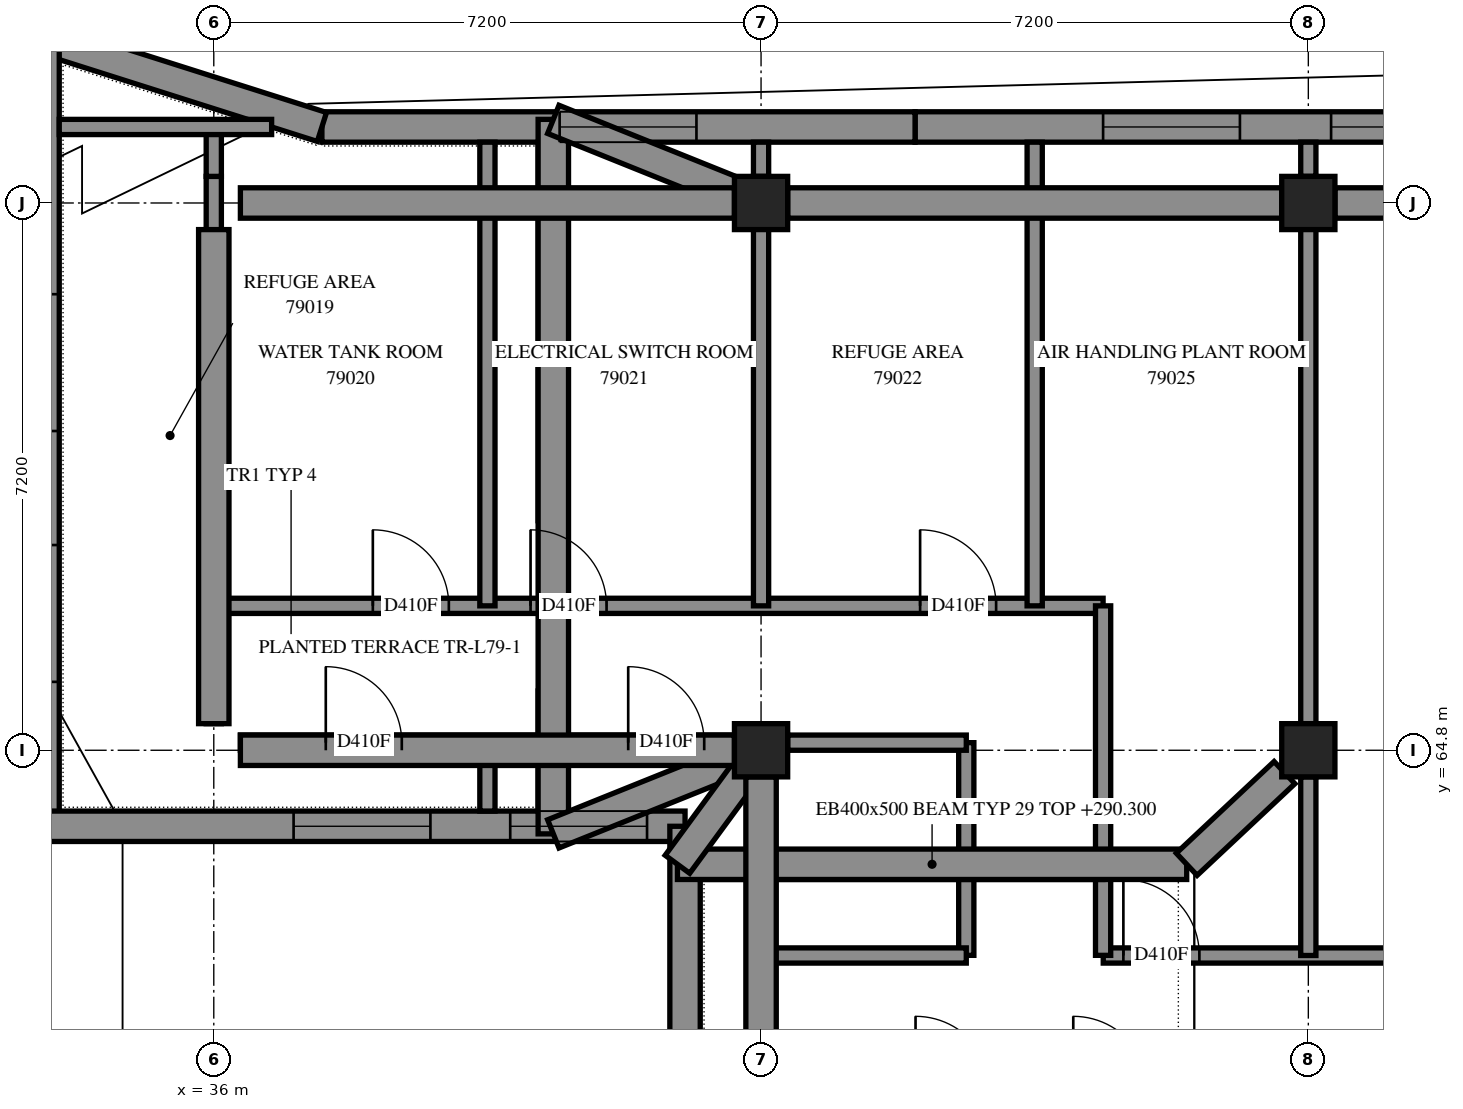
"""IFC4 building model, lengths in metres.
Left out: names, types, materials, properties, quantities, classifications, styles, units other than length and angle.
Written with IfcOpenShell. Run it as: python <this file> out.ifc"""

import sys

from ifc_helpers import new_model, si_unit, direction, frame, frame_2d, origin, origin_2d, place, context, subcontext, project, spatial, polyline, rectangle, outline, extrude, element, fill, save


model = new_model("IFC4")
c1 = context("Model", 3, precision=1e-05, world=origin(), true_north=direction((0.0, 1.0)))
c2 = subcontext(c1, "Body", "Model", "MODEL_VIEW")
j1 = project(units=[si_unit("LENGTHUNIT", "METRE"), si_unit("PLANEANGLEUNIT", "RADIAN")], contexts=[c1])
p1 = place(None, origin())
s1 = spatial("IfcSite", under=j1, at=p1, CompositionType="ELEMENT")
p2 = place(p1, origin())
s2 = spatial("IfcBuilding", under=s1, at=p2, CompositionType="ELEMENT")
p3 = place(p2, frame((0.0, 0.0, 290.6)))
s3 = spatial("IfcBuildingStorey", under=s2, at=p3, CompositionType="ELEMENT", Elevation=290.6)
for number, where, z_axis, x_axis in (
    (1, (43.2, 64.8, 0.0), (0.0, 0.0, 1.0), (1.0, 0.0, 0.0)),
    (2, (43.2, 72.0, 0.0), (0.0, 0.0, 1.0), (1.0, 0.0, 0.0)),
    (3, (50.4, 64.8, 0.0), (0.0, 0.0, 1.0), (1.0, 0.0, 0.0)),
    (4, (50.4, 72.0, 0.0), (0.0, 0.0, 1.0), (1.0, 0.0, 0.0)),
):
    element("IfcColumn", number, at=place(p3, frame(where, z_axis=z_axis, x_axis=x_axis)), inside=s3, PredefinedType="COLUMN", context=c2, shape_type="SweptSolid", body=[
        extrude(rectangle(XDim=0.7, YDim=0.7, at=origin_2d()), origin(), (0.0, 0.0, 1.0), 3.5),
    ])
p4 = place(p3, frame((52.999, 73.0, 0.0), z_axis=(0.0, 0.0, 1.0), x_axis=(-1.0, 0.0, 0.0)))
e5 = element("IfcWall", 5, at=p4, inside=s3, PredefinedType="SOLIDWALL", context=c2, shape_type="SweptSolid", body=[
    extrude(outline(polyline([(0.0, -0.2), (7.773, -0.2), (7.773, 0.2), (0.0, 0.2), (0.0, -0.2)])), origin(), (0.0, 0.0, 1.0), 3.0),
])
p5 = place(p4, frame((0.499, 0.0, 0.7)))
e6 = element("IfcOpeningElement", 6, at=p5, cuts=e5, PredefinedType="OPENING", context=c2, shape_type="SweptSolid", body=[
    extrude(rectangle(XDim=1.8, YDim=2.2, at=frame_2d((0.9, 1.1))), frame((0.0, 0.21, 0.0), z_axis=(0.0, -1.0, 0.0), x_axis=(1.0, 0.0, 0.0)), (0.0, 0.0, 1.0), 0.42),
])
p6 = place(p4, frame((3.499, 0.0, 0.7)))
e7 = element("IfcOpeningElement", 7, at=p6, cuts=e5, PredefinedType="OPENING", context=c2, shape_type="SweptSolid", body=[
    extrude(rectangle(XDim=1.8, YDim=2.2, at=frame_2d((0.9, 1.1))), frame((0.0, 0.21, 0.0), z_axis=(0.0, -1.0, 0.0), x_axis=(1.0, 0.0, 0.0)), (0.0, 0.0, 1.0), 0.42),
])
p7 = place(p3, frame((45.226, 73.0, 0.0), z_axis=(0.0, 0.0, 1.0), x_axis=(-1.0, 0.0, 0.0)))
e8 = element("IfcWall", 8, at=p7, inside=s3, PredefinedType="SOLIDWALL", context=c2, shape_type="SweptSolid", body=[
    extrude(outline(polyline([(0.0, -0.2), (7.773, -0.2), (7.835, 0.2), (0.0, 0.2), (0.0, -0.2)])), origin(), (0.0, 0.0, 1.0), 3.5),
])
p8 = place(p7, frame((2.876, 0.0, 0.7)))
e9 = element("IfcOpeningElement", 9, at=p8, cuts=e8, PredefinedType="OPENING", context=c2, shape_type="SweptSolid", body=[
    extrude(rectangle(XDim=1.8, YDim=2.2, at=frame_2d((0.9, 1.1))), frame((0.0, 0.21, 0.0), z_axis=(0.0, -1.0, 0.0), x_axis=(1.0, 0.0, 0.0)), (0.0, 0.0, 1.0), 0.42),
])
p9 = place(p3, frame((37.422, 73.0, 0.0), z_axis=(0.0, 0.0, 1.0), x_axis=(-0.9531802344, 0.3024027789, 0.0)))
e10 = element("IfcWall", 10, at=p9, inside=s3, PredefinedType="SOLIDWALL", context=c2, shape_type="SweptSolid", body=[
    extrude(outline(polyline([(0.031, -0.2), (4.108, -0.2), (3.562, 0.2), (-0.031, 0.2), (0.031, -0.2)])), origin(), (0.0, 0.0, 1.0), 3.5),
])
p10 = place(p3, frame((33.767, 74.16, 0.0), z_axis=(0.0, 0.0, 1.0), x_axis=(0.0, -1.0, 0.0)))
e11 = element("IfcWall", 11, at=p10, inside=s3, PredefinedType="SOLIDWALL", context=c2, shape_type="SweptSolid", body=[
    extrude(outline(polyline([(-0.273, -0.2), (10.56, -0.2), (10.16, 0.2), (0.273, 0.2), (-0.273, -0.2)])), origin(), (0.0, 0.0, 1.0), 3.5),
])
p11 = place(p10, frame((3.36, 0.0, 0.7)))
e12 = element("IfcOpeningElement", 12, at=p11, cuts=e11, PredefinedType="OPENING", context=c2, shape_type="SweptSolid", body=[
    extrude(rectangle(XDim=1.8, YDim=2.2, at=frame_2d((0.9, 1.1))), frame((0.0, 0.21, 0.0), z_axis=(0.0, -1.0, 0.0), x_axis=(1.0, 0.0, 0.0)), (0.0, 0.0, 1.0), 0.42),
])
p12 = place(p10, frame((6.66, 0.0, 0.7)))
e13 = element("IfcOpeningElement", 13, at=p12, cuts=e11, PredefinedType="OPENING", context=c2, shape_type="SweptSolid", body=[
    extrude(rectangle(XDim=1.8, YDim=2.2, at=frame_2d((0.9, 1.1))), frame((0.0, 0.21, 0.0), z_axis=(0.0, -1.0, 0.0), x_axis=(1.0, 0.0, 0.0)), (0.0, 0.0, 1.0), 0.42),
])
p13 = place(p3, frame((33.767, 63.8, 0.0), z_axis=(0.0, 0.0, 1.0), x_axis=(1.0, 0.0, 0.0)))
e14 = element("IfcWall", 14, at=p13, inside=s3, PredefinedType="SOLIDWALL", context=c2, shape_type="SweptSolid", body=[
    extrude(outline(polyline([(-0.2, -0.2), (8.233, -0.2), (8.633, 0.2), (0.2, 0.2), (-0.2, -0.2)])), origin(), (0.0, 0.0, 1.0), 3.5),
])
p14 = place(p13, frame((3.283, 0.0, 0.7)))
e15 = element("IfcOpeningElement", 15, at=p14, cuts=e14, PredefinedType="OPENING", context=c2, shape_type="SweptSolid", body=[
    extrude(rectangle(XDim=1.8, YDim=2.2, at=frame_2d((0.9, 1.1))), frame((0.0, 0.21, 0.0), z_axis=(0.0, -1.0, 0.0), x_axis=(1.0, 0.0, 0.0)), (0.0, 0.0, 1.0), 0.42),
])
p15 = place(p13, frame((6.133, 0.0, 0.7)))
e16 = element("IfcOpeningElement", 16, at=p15, cuts=e14, PredefinedType="OPENING", context=c2, shape_type="SweptSolid", body=[
    extrude(rectangle(XDim=1.8, YDim=2.2, at=frame_2d((0.9, 1.1))), frame((0.0, 0.21, 0.0), z_axis=(0.0, -1.0, 0.0), x_axis=(1.0, 0.0, 0.0)), (0.0, 0.0, 1.0), 0.42),
])
p16 = place(p3, frame((42.2, 63.8, 0.0), z_axis=(0.0, 0.0, 1.0), x_axis=(0.0, -1.0, 0.0)))
e17 = element("IfcWall", 17, at=p16, inside=s3, PredefinedType="SOLIDWALL", context=c2, shape_type="SweptSolid", body=[
    extrude(outline(polyline([(0.2, -0.2), (7.4, -0.2), (7.0, 0.2), (-0.2, 0.2), (0.2, -0.2)])), origin(), (0.0, 0.0, 1.0), 3.5),
])
p17 = place(p16, frame((3.6, 0.0, 0.7)))
e18 = element("IfcOpeningElement", 18, at=p17, cuts=e17, PredefinedType="OPENING", context=c2, shape_type="SweptSolid", body=[
    extrude(rectangle(XDim=1.8, YDim=2.2, at=frame_2d((0.9, 1.1))), frame((0.0, 0.21, 0.0), z_axis=(0.0, -1.0, 0.0), x_axis=(1.0, 0.0, 0.0)), (0.0, 0.0, 1.0), 0.42),
])
p18 = place(p3, frame((36.0, 66.7, 0.0), z_axis=(0.0, 0.0, 1.0), x_axis=(1.0, 0.0, 0.0)))
e19 = element("IfcWall", 19, at=p18, inside=s3, PredefinedType="PARTITIONING", context=c2, shape_type="SweptSolid", body=[
    extrude(rectangle(XDim=11.7, YDim=0.2, at=frame_2d((5.85, 0.0))), origin(), (0.0, 0.0, 1.0), 3.5),
])
p19 = place(p18, frame((2.092, 0.0, 0.0)))
e20 = element("IfcOpeningElement", 20, at=p19, cuts=e19, PredefinedType="OPENING", context=c2, shape_type="SweptSolid", body=[
    extrude(rectangle(XDim=1.0, YDim=2.1, at=frame_2d((0.5, 1.05))), frame((0.0, 0.11, 0.0), z_axis=(0.0, -1.0, 0.0), x_axis=(1.0, 0.0, 0.0)), (0.0, 0.0, 1.0), 0.22),
])
p20 = place(p18, frame((4.168, 0.0, 0.0)))
e21 = element("IfcOpeningElement", 21, at=p20, cuts=e19, PredefinedType="OPENING", context=c2, shape_type="SweptSolid", body=[
    extrude(rectangle(XDim=1.0, YDim=2.1, at=frame_2d((0.5, 1.05))), frame((0.0, 0.11, 0.0), z_axis=(0.0, -1.0, 0.0), x_axis=(1.0, 0.0, 0.0)), (0.0, 0.0, 1.0), 0.22),
])
p21 = place(p18, frame((9.293, 0.0, 0.0)))
e22 = element("IfcOpeningElement", 22, at=p21, cuts=e19, PredefinedType="OPENING", context=c2, shape_type="SweptSolid", body=[
    extrude(rectangle(XDim=1.0, YDim=2.1, at=frame_2d((0.5, 1.05))), frame((0.0, 0.11, 0.0), z_axis=(0.0, -1.0, 0.0), x_axis=(1.0, 0.0, 0.0)), (0.0, 0.0, 1.0), 0.22),
])
p22 = place(p3, frame((47.702, 62.1, 0.0), z_axis=(0.0, 0.0, 1.0), x_axis=(1.0, 0.0, 0.0)))
e23 = element("IfcWall", 23, at=p22, inside=s3, PredefinedType="PARTITIONING", context=c2, shape_type="SweptSolid", body=[
    extrude(rectangle(XDim=7.698, YDim=0.2, at=frame_2d((3.849, 0.0))), origin(), (0.0, 0.0, 1.0), 3.5),
])
p23 = place(p22, frame((0.265, 0.0, 0.0)))
e24 = element("IfcOpeningElement", 24, at=p23, cuts=e23, PredefinedType="OPENING", context=c2, shape_type="SweptSolid", body=[
    extrude(rectangle(XDim=1.0, YDim=2.1, at=frame_2d((0.5, 1.05))), frame((0.0, 0.11, 0.0), z_axis=(0.0, -1.0, 0.0), x_axis=(1.0, 0.0, 0.0)), (0.0, 0.0, 1.0), 0.22),
])
p24 = place(p22, frame((4.79, 0.0, 0.0)))
e25 = element("IfcOpeningElement", 25, at=p24, cuts=e23, PredefinedType="OPENING", context=c2, shape_type="SweptSolid", body=[
    extrude(rectangle(XDim=1.0, YDim=2.1, at=frame_2d((0.5, 1.05))), frame((0.0, 0.11, 0.0), z_axis=(0.0, -1.0, 0.0), x_axis=(1.0, 0.0, 0.0)), (0.0, 0.0, 1.0), 0.22),
])
p25 = place(p22, frame((6.495, 0.0, 0.0)))
e26 = element("IfcOpeningElement", 26, at=p25, cuts=e23, PredefinedType="OPENING", context=c2, shape_type="SweptSolid", body=[
    extrude(rectangle(XDim=1.0, YDim=2.1, at=frame_2d((0.5, 1.05))), frame((0.0, 0.11, 0.0), z_axis=(0.0, -1.0, 0.0), x_axis=(1.0, 0.0, 0.0)), (0.0, 0.0, 1.0), 0.22),
])
p26 = place(p3, frame((36.35, 64.9, 0.0), z_axis=(0.0, 0.0, 1.0), x_axis=(1.0, 0.0, 0.0)))
e27 = element("IfcWall", 27, at=p26, inside=s3, PredefinedType="PARTITIONING", context=c2, shape_type="SweptSolid", body=[
    extrude(rectangle(XDim=7.2, YDim=0.2, at=frame_2d((3.6, 0.0))), origin(), (0.0, 0.0, 1.0), 3.5),
])
p27 = place(p26, frame((1.123, 0.0, 0.0)))
e28 = element("IfcOpeningElement", 28, at=p27, cuts=e27, PredefinedType="OPENING", context=c2, shape_type="SweptSolid", body=[
    extrude(rectangle(XDim=1.0, YDim=2.1, at=frame_2d((0.5, 1.05))), frame((0.0, 0.11, 0.0), z_axis=(0.0, -1.0, 0.0), x_axis=(1.0, 0.0, 0.0)), (0.0, 0.0, 1.0), 0.22),
])
p28 = place(p26, frame((5.102, 0.0, 0.0)))
e29 = element("IfcOpeningElement", 29, at=p28, cuts=e27, PredefinedType="OPENING", context=c2, shape_type="SweptSolid", body=[
    extrude(rectangle(XDim=1.0, YDim=2.1, at=frame_2d((0.5, 1.05))), frame((0.0, 0.11, 0.0), z_axis=(0.0, -1.0, 0.0), x_axis=(1.0, 0.0, 0.0)), (0.0, 0.0, 1.0), 0.22),
])
p29 = place(p3, frame((50.4, 64.45, 0.0), z_axis=(0.0, 0.0, 1.0), x_axis=(0.0, 1.0, 0.0)))
e30 = element("IfcWall", 30, at=p29, inside=s3, PredefinedType="PARTITIONING", context=c2, shape_type="SweptSolid", body=[
    extrude(rectangle(XDim=7.9, YDim=0.2, at=frame_2d((3.95, 0.0))), origin(), (0.0, 0.0, 1.0), 3.5),
])
p30 = place(p3, frame((36.0, 66.7, 0.0), z_axis=(0.0, 0.0, 1.0), x_axis=(0.0, 1.0, 0.0)))
e31 = element("IfcWall", 31, at=p30, inside=s3, PredefinedType="PARTITIONING", context=c2, shape_type="SweptSolid", body=[
    extrude(rectangle(XDim=5.65, YDim=0.2, at=frame_2d((2.825, 0.0))), origin(), (0.0, 0.0, 1.0), 3.5),
])
p31 = place(p3, frame((43.2, 66.7, 0.0), z_axis=(0.0, 0.0, 1.0), x_axis=(0.0, 1.0, 0.0)))
e32 = element("IfcWall", 32, at=p31, inside=s3, PredefinedType="PARTITIONING", context=c2, shape_type="SweptSolid", body=[
    extrude(rectangle(XDim=5.65, YDim=0.2, at=frame_2d((2.825, 0.0))), origin(), (0.0, 0.0, 1.0), 3.0),
])
p32 = place(p3, frame((47.7, 62.102, 0.0), z_axis=(0.0, 0.0, 1.0), x_axis=(0.0, 1.0, 0.0)))
e33 = element("IfcWall", 33, at=p32, inside=s3, PredefinedType="PARTITIONING", context=c2, shape_type="SweptSolid", body=[
    extrude(rectangle(XDim=4.598, YDim=0.2, at=frame_2d((2.299, 0.0))), origin(), (0.0, 0.0, 1.0), 3.0),
])
p33 = place(p3, frame((45.9, 62.102, 0.0), z_axis=(0.0, 0.0, 1.0), x_axis=(0.0, 1.0, 0.0)))
e34 = element("IfcWall", 34, at=p33, inside=s3, PredefinedType="PARTITIONING", context=c2, shape_type="SweptSolid", body=[
    extrude(rectangle(XDim=2.798, YDim=0.2, at=frame_2d((1.399, 0.0))), origin(), (0.0, 0.0, 1.0), 3.5),
])
p34 = place(p3, frame((43.202, 62.1, 0.0), z_axis=(0.0, 0.0, 1.0), x_axis=(1.0, 0.0, 0.0)))
e35 = element("IfcWall", 35, at=p34, inside=s3, PredefinedType="PARTITIONING", context=c2, shape_type="SweptSolid", body=[
    extrude(rectangle(XDim=2.698, YDim=0.2, at=frame_2d((1.349, 0.0))), origin(), (0.0, 0.0, 1.0), 3.5),
])
for number, where, z_axis, x_axis in (
    (36, (43.55, 64.9, 0.0), (0.0, 0.0, 1.0), (1.0, 0.0, 0.0)),
    (37, (50.4, 62.1, 0.0), (0.0, 0.0, 1.0), (0.0, 1.0, 0.0)),
):
    element("IfcWall", number, at=place(p3, frame(where, z_axis=z_axis, x_axis=x_axis)), inside=s3, PredefinedType="PARTITIONING", context=c2, shape_type="SweptSolid", body=[
        extrude(rectangle(XDim=2.35, YDim=0.2, at=frame_2d((1.175, 0.0))), origin(), (0.0, 0.0, 1.0), 3.0),
    ])
p35 = place(p3, frame((43.2, 60.3, 0.0), z_axis=(0.0, 0.0, 1.0), x_axis=(0.0, 1.0, 0.0)))
e38 = element("IfcWall", 38, at=p35, inside=s3, PredefinedType="PARTITIONING", context=c2, shape_type="SweptSolid", body=[
    extrude(rectangle(XDim=1.8, YDim=0.2, at=frame_2d((0.9, 0.0))), origin(), (0.0, 0.0, 1.0), 3.5),
])
p36 = place(p3, frame((36.0, 65.15, 0.0), z_axis=(0.0, 0.0, 1.0), x_axis=(0.0, 1.0, 0.0)))
e39 = element("IfcWall", 39, at=p36, inside=s3, PredefinedType="PARTITIONING", context=c2, shape_type="SweptSolid", body=[
    extrude(rectangle(XDim=1.55, YDim=0.2, at=frame_2d((0.775, 0.0))), origin(), (0.0, 0.0, 1.0), 3.5),
])
p37 = place(p3, frame((36.0, 72.35, 0.0), z_axis=(0.0, 0.0, 1.0), x_axis=(0.0, 1.0, 0.0)))
e40 = element("IfcWall", 40, at=p37, inside=s3, PredefinedType="PARTITIONING", context=c2, shape_type="SweptSolid", body=[
    extrude(rectangle(XDim=0.65, YDim=0.2, at=frame_2d((0.325, 0.0))), origin(), (0.0, 0.0, 1.0), 3.5),
])
p38 = place(p3, frame((40.367, 64.0, 0.0), z_axis=(0.0, 0.0, 1.0), x_axis=(0.0, 1.0, 0.0)))
e41 = element("IfcWall", 41, at=p38, inside=s3, PredefinedType="PARAPET", context=c2, shape_type="SweptSolid", body=[
    extrude(outline(polyline([(0.0, -0.1), (1.58, -0.1), (1.58, 0.1), (0.0, 0.1), (0.0, -0.1)])), origin(), (0.0, 0.0, 1.0), 0.25),
])
p39 = place(p3, frame((40.367, 67.82, 0.0), z_axis=(0.0, 0.0, 1.0), x_axis=(0.0, 1.0, 0.0)))
e42 = element("IfcWall", 42, at=p39, inside=s3, PredefinedType="PARAPET", context=c2, shape_type="SweptSolid", body=[
    extrude(outline(polyline([(0.0, -0.1), (4.98, -0.1), (4.98, 0.1), (0.0, 0.1), (0.0, -0.1)])), origin(), (0.0, 0.0, 1.0), 0.25),
])
p40 = place(p3, frame((47.697, 63.2, 0.0), z_axis=(0.0, 0.0, 1.0), x_axis=(-1.0, 0.0, 0.0)))
e43 = element("IfcWall", 43, at=p40, inside=s3, PredefinedType="PARAPET", context=c2, shape_type="SweptSolid", body=[
    extrude(outline(polyline([(0.0, -0.1), (5.297, -0.1), (5.297, 0.1), (0.0, 0.1), (0.0, -0.1)])), origin(), (0.0, 0.0, 1.0), 0.25),
])
p41 = place(p3, frame((33.967, 73.0, 0.0), z_axis=(0.0, 0.0, 1.0), x_axis=(1.0, 0.0, 0.0)))
e44 = element("IfcWall", 44, at=p41, inside=s3, PredefinedType="PARTITIONING", context=c2, shape_type="SweptSolid", body=[
    extrude(outline(polyline([(0.0, -0.1), (2.794, -0.1), (2.794, 0.1), (0.0, 0.1), (0.0, -0.1)])), origin(), (0.0, 0.0, 1.0), 3.5),
])
for number, where, z_axis, x_axis in (
    (45, (39.6, 66.7, 0.0), (0.0, 0.0, 1.0), (0.0, 1.0, 0.0)),
    (46, (46.8, 66.7, 0.0), (0.0, 0.0, 1.0), (0.0, 1.0, 0.0)),
):
    element("IfcWall", number, at=place(p3, frame(where, z_axis=z_axis, x_axis=x_axis)), inside=s3, PredefinedType="PARTITIONING", context=c2, shape_type="SweptSolid", body=[
        extrude(outline(polyline([(0.0, -0.1), (6.1, -0.1), (6.1, 0.1), (0.0, 0.1), (0.0, -0.1)])), origin(), (0.0, 0.0, 1.0), 3.5),
    ])
p42 = place(p3, frame((39.6, 64.0, 0.0), z_axis=(0.0, 0.0, 1.0), x_axis=(0.0, 1.0, 0.0)))
e47 = element("IfcWall", 47, at=p42, inside=s3, PredefinedType="PARTITIONING", context=c2, shape_type="SweptSolid", body=[
    extrude(outline(polyline([(0.0, -0.1), (0.9, -0.1), (0.9, 0.1), (0.0, 0.1), (0.0, -0.1)])), origin(), (0.0, 0.0, 1.0), 3.5),
])
for number, where, z_axis, x_axis in (
    (48, (43.2, 72.35, 0.0), (0.0, 0.0, 1.0), (0.0, 1.0, 0.0)),
    (49, (50.4, 72.35, 0.0), (0.0, 0.0, 1.0), (0.0, 1.0, 0.0)),
):
    element("IfcWall", number, at=place(p3, frame(where, z_axis=z_axis, x_axis=x_axis)), inside=s3, PredefinedType="PARTITIONING", context=c2, shape_type="SweptSolid", body=[
        extrude(outline(polyline([(0.0, -0.1), (0.45, -0.1), (0.45, 0.1), (0.0, 0.1), (0.0, -0.1)])), origin(), (0.0, 0.0, 1.0), 3.5),
    ])
p43 = place(p5, origin())
e50 = element("IfcWindow", 50, at=p43, inside=s3, PartitioningType="SINGLE_PANEL", PredefinedType="WINDOW", context=c2, shape_type="SweptSolid", body=[
    extrude(rectangle(XDim=1.8, YDim=2.2, at=frame_2d((0.9, 1.1))), frame((0.0, 0.08, 0.0), z_axis=(0.0, -1.0, 0.0), x_axis=(1.0, 0.0, 0.0)), (0.0, 0.0, 1.0), 0.06),
])
fill(e6, e50)
p44 = place(p6, origin())
e51 = element("IfcWindow", 51, at=p44, inside=s3, PartitioningType="SINGLE_PANEL", PredefinedType="WINDOW", context=c2, shape_type="SweptSolid", body=[
    extrude(rectangle(XDim=1.8, YDim=2.2, at=frame_2d((0.9, 1.1))), frame((0.0, 0.08, 0.0), z_axis=(0.0, -1.0, 0.0), x_axis=(1.0, 0.0, 0.0)), (0.0, 0.0, 1.0), 0.06),
])
fill(e7, e51)
p45 = place(p8, origin())
e52 = element("IfcWindow", 52, at=p45, inside=s3, PartitioningType="SINGLE_PANEL", PredefinedType="WINDOW", context=c2, shape_type="SweptSolid", body=[
    extrude(rectangle(XDim=1.8, YDim=2.2, at=frame_2d((0.9, 1.1))), frame((0.0, 0.08, 0.0), z_axis=(0.0, -1.0, 0.0), x_axis=(1.0, 0.0, 0.0)), (0.0, 0.0, 1.0), 0.06),
])
fill(e9, e52)
p46 = place(p14, origin())
e53 = element("IfcWindow", 53, at=p46, inside=s3, PartitioningType="SINGLE_PANEL", PredefinedType="WINDOW", context=c2, shape_type="SweptSolid", body=[
    extrude(rectangle(XDim=1.8, YDim=2.2, at=frame_2d((0.9, 1.1))), frame((0.0, 0.08, 0.0), z_axis=(0.0, -1.0, 0.0), x_axis=(1.0, 0.0, 0.0)), (0.0, 0.0, 1.0), 0.06),
])
fill(e15, e53)
p47 = place(p15, origin())
e54 = element("IfcWindow", 54, at=p47, inside=s3, PartitioningType="SINGLE_PANEL", PredefinedType="WINDOW", context=c2, shape_type="SweptSolid", body=[
    extrude(rectangle(XDim=1.8, YDim=2.2, at=frame_2d((0.9, 1.1))), frame((0.0, 0.08, 0.0), z_axis=(0.0, -1.0, 0.0), x_axis=(1.0, 0.0, 0.0)), (0.0, 0.0, 1.0), 0.06),
])
fill(e16, e54)
p48 = place(p27, origin())
e55 = element("IfcDoor", 55, at=p48, inside=s3, OperationType="SINGLE_SWING_RIGHT", PredefinedType="DOOR", context=c2, shape_type="SweptSolid", body=[
    extrude(rectangle(XDim=1.0, YDim=2.1, at=frame_2d((0.5, 1.05))), frame((0.0, 0.025, 0.0), z_axis=(0.0, -1.0, 0.0), x_axis=(1.0, 0.0, 0.0)), (0.0, 0.0, 1.0), 0.05),
])
fill(e28, e55)
p49 = place(p19, origin())
e56 = element("IfcDoor", 56, at=p49, inside=s3, OperationType="SINGLE_SWING_RIGHT", PredefinedType="DOOR", context=c2, shape_type="SweptSolid", body=[
    extrude(rectangle(XDim=1.0, YDim=2.1, at=frame_2d((0.5, 1.05))), frame((0.0, 0.025, 0.0), z_axis=(0.0, -1.0, 0.0), x_axis=(1.0, 0.0, 0.0)), (0.0, 0.0, 1.0), 0.05),
])
fill(e20, e56)
p50 = place(p20, origin())
e57 = element("IfcDoor", 57, at=p50, inside=s3, OperationType="SINGLE_SWING_LEFT", PredefinedType="DOOR", context=c2, shape_type="SweptSolid", body=[
    extrude(rectangle(XDim=1.0, YDim=2.1, at=frame_2d((0.5, 1.05))), frame((0.0, 0.025, 0.0), z_axis=(0.0, -1.0, 0.0), x_axis=(1.0, 0.0, 0.0)), (0.0, 0.0, 1.0), 0.05),
])
fill(e21, e57)
p51 = place(p21, origin())
e58 = element("IfcDoor", 58, at=p51, inside=s3, OperationType="SINGLE_SWING_RIGHT", PredefinedType="DOOR", context=c2, shape_type="SweptSolid", body=[
    extrude(rectangle(XDim=1.0, YDim=2.1, at=frame_2d((0.5, 1.05))), frame((0.0, 0.025, 0.0), z_axis=(0.0, -1.0, 0.0), x_axis=(1.0, 0.0, 0.0)), (0.0, 0.0, 1.0), 0.05),
])
fill(e22, e58)
p52 = place(p28, origin())
e59 = element("IfcDoor", 59, at=p52, inside=s3, OperationType="SINGLE_SWING_RIGHT", PredefinedType="DOOR", context=c2, shape_type="SweptSolid", body=[
    extrude(rectangle(XDim=1.0, YDim=2.1, at=frame_2d((0.5, 1.05))), frame((0.0, 0.025, 0.0), z_axis=(0.0, -1.0, 0.0), x_axis=(1.0, 0.0, 0.0)), (0.0, 0.0, 1.0), 0.05),
])
fill(e29, e59)
p53 = place(p23, origin())
e60 = element("IfcDoor", 60, at=p53, inside=s3, OperationType="SINGLE_SWING_LEFT", PredefinedType="DOOR", context=c2, shape_type="SweptSolid", body=[
    extrude(rectangle(XDim=1.0, YDim=2.1, at=frame_2d((0.5, 1.05))), frame((0.0, 0.025, 0.0), z_axis=(0.0, -1.0, 0.0), x_axis=(1.0, 0.0, 0.0)), (0.0, 0.0, 1.0), 0.05),
])
fill(e24, e60)
save(model, sys.argv[1])
